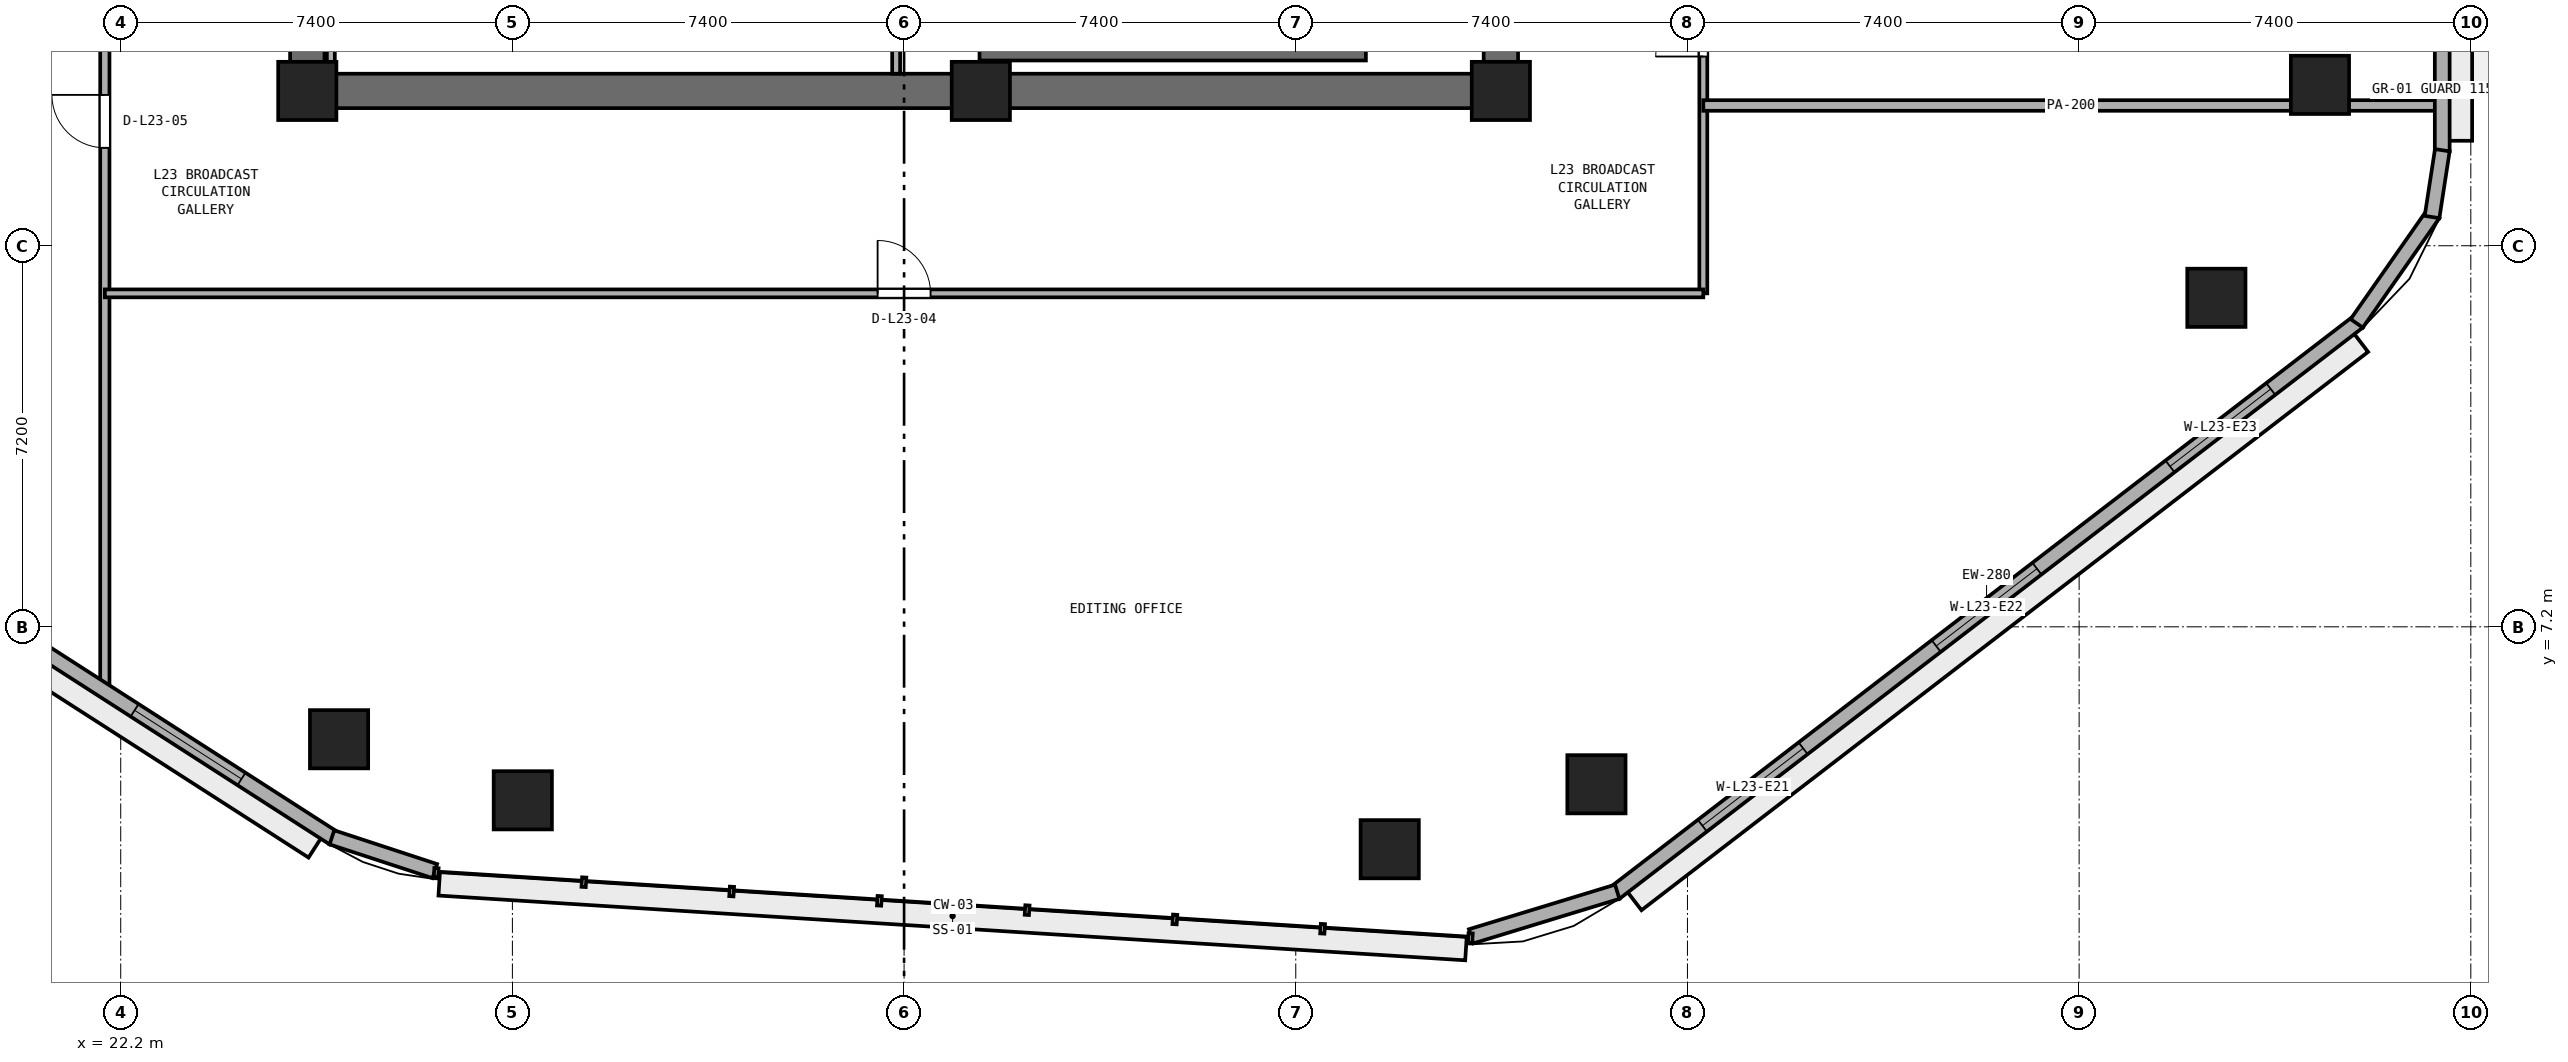
"""IFC4 building model, lengths in metres.
Left out: names, types, materials, properties, quantities, classifications, styles, units other than length and angle.
Written with IfcOpenShell. Run it as: python <this file> out.ifc"""

import sys

from ifc_helpers import new_model, si_unit, direction, frame, frame_2d, origin, origin_2d, place, context, subcontext, project, spatial, rectangle, extrude, element, fill, save


model = new_model("IFC4")
c1 = context("Model", 3, precision=1e-05, world=origin(), true_north=direction((0.0, 1.0)))
c2 = subcontext(c1, "Body", "Model", "MODEL_VIEW")
j1 = project(units=[si_unit("LENGTHUNIT", "METRE"), si_unit("PLANEANGLEUNIT", "RADIAN")], contexts=[c1])
p1 = place(None, origin())
s1 = spatial("IfcSite", under=j1, at=p1, CompositionType="ELEMENT")
p2 = place(p1, origin())
s2 = spatial("IfcBuilding", under=s1, at=p2, CompositionType="ELEMENT")
p3 = place(p2, frame((0.0, 0.0, 93.4)))
s3 = spatial("IfcBuildingStorey", under=s2, at=p3, CompositionType="ELEMENT", Elevation=93.4)
p4 = place(p3, frame((25.4, 17.325, 0.0), z_axis=(0.0, 0.0, 1.0), x_axis=(1.0, 0.0, 0.0)))
e1 = element("IfcWall", 1, at=p4, inside=s3, PredefinedType="SHEAR", context=c2, shape_type="SweptSolid", body=[
    extrude(rectangle(XDim=23.2, YDim=0.65, at=frame_2d((11.6, 0.0))), origin(), (0.0, 0.0, 1.0), 3.525),
])
p5 = place(p3, frame((25.725, 17.65, 0.0), z_axis=(0.0, 0.0, 1.0), x_axis=(0.0, 1.0, 0.0)))
e2 = element("IfcWall", 2, at=p5, inside=s3, PredefinedType="SHEAR", context=c2, shape_type="SweptSolid", body=[
    extrude(rectangle(XDim=15.1, YDim=0.65, at=frame_2d((7.55, 0.0))), origin(), (0.0, 0.0, 1.0), 3.525),
])
p6 = place(p5, frame((6.8, 0.0, 0.0)))
e3 = element("IfcOpeningElement", 3, at=p6, cuts=e2, PredefinedType="OPENING", context=c2, shape_type="SweptSolid", body=[
    extrude(rectangle(XDim=1.5, YDim=2.15, at=frame_2d((0.75, 1.075))), frame((0.0, 0.335, 0.0), z_axis=(0.0, -1.0, 0.0), x_axis=(1.0, 0.0, 0.0)), (0.0, 0.0, 1.0), 0.67),
])
p7 = place(p3, frame((48.275, 17.65, 0.0), z_axis=(0.0, 0.0, 1.0), x_axis=(0.0, 1.0, 0.0)))
e4 = element("IfcWall", 4, at=p7, inside=s3, PredefinedType="SHEAR", context=c2, shape_type="SweptSolid", body=[
    extrude(rectangle(XDim=15.1, YDim=0.65, at=frame_2d((7.55, 0.0))), origin(), (0.0, 0.0, 1.0), 3.525),
])
p8 = place(p7, frame((5.65, 0.0, 0.0)))
e5 = element("IfcOpeningElement", 5, at=p8, cuts=e4, PredefinedType="OPENING", context=c2, shape_type="SweptSolid", body=[
    extrude(rectangle(XDim=1.5, YDim=2.15, at=frame_2d((0.75, 1.075))), frame((0.0, 0.335, 0.0), z_axis=(0.0, -1.0, 0.0), x_axis=(1.0, 0.0, 0.0)), (0.0, 0.0, 1.0), 0.67),
])
for number, where, z_axis, x_axis in (
    (6, (25.725, 17.325, 0.0), (0.0, 0.0, 1.0), (1.0, 0.0, 0.0)),
    (7, (38.45, 17.325, 0.0), (0.0, 0.0, 1.0), (1.0, 0.0, 0.0)),
    (8, (48.275, 17.325, 0.0), (0.0, 0.0, 1.0), (1.0, 0.0, 0.0)),
):
    element("IfcColumn", number, at=place(p3, frame(where, z_axis=z_axis, x_axis=x_axis)), inside=s3, PredefinedType="PILASTER", context=c2, shape_type="SweptSolid", body=[
        extrude(rectangle(XDim=1.1, YDim=1.1, at=origin_2d()), origin(), (0.0, 0.0, 1.0), 3.8),
    ])
for number, where, z_axis, x_axis in (
    (9, (29.796, 3.922, 0.0), (0.0, 0.0, 1.0), (1.0, 0.0, 0.0)),
    (10, (46.175, 2.998, 0.0), (0.0, 0.0, 1.0), (1.0, 0.0, 0.0)),
    (11, (50.081, 4.225, 0.0), (0.0, 0.0, 1.0), (1.0, 0.0, 0.0)),
    (12, (61.793, 13.416, 0.0), (0.0, 0.0, 1.0), (1.0, 0.0, 0.0)),
    (13, (63.75, 17.44, 0.0), (0.0, 0.0, 1.0), (1.0, 0.0, 0.0)),
    (14, (26.325, 5.076, 0.0), (0.0, 0.0, 1.0), (1.0, 0.0, 0.0)),
):
    element("IfcColumn", number, at=place(p3, frame(where, z_axis=z_axis, x_axis=x_axis)), inside=s3, PredefinedType="COLUMN", context=c2, shape_type="SweptSolid", body=[
        extrude(rectangle(XDim=1.1, YDim=1.1, at=origin_2d()), origin(), (0.0, 0.0, 1.0), 3.8),
    ])
p9 = place(p3, frame((38.425, 18.025, 0.0), z_axis=(0.0, 0.0, 1.0), x_axis=(1.0, 0.0, 0.0)))
e15 = element("IfcWall", 15, at=p9, inside=s3, PredefinedType="SHEAR", context=c2, shape_type="SweptSolid", body=[
    extrude(rectangle(XDim=7.3, YDim=0.25, at=frame_2d((3.65, 0.0))), origin(), (0.0, 0.0, 1.0), 3.525),
])
for number, where, z_axis, x_axis in (
    (16, (26.17, 17.65, 0.0), (0.0, 0.0, 1.0), (0.0, 1.0, 0.0)),
    (17, (36.85, 17.65, 0.0), (0.0, 0.0, 1.0), (0.0, 1.0, 0.0)),
):
    element("IfcWall", number, at=place(p3, frame(where, z_axis=z_axis, x_axis=x_axis)), inside=s3, PredefinedType="PARTITIONING", context=c2, shape_type="SweptSolid", body=[
        extrude(rectangle(XDim=2.1, YDim=0.15, at=frame_2d((1.05, 0.0))), origin(), (0.0, 0.0, 1.0), 3.525),
    ])
p10 = place(p3, frame((52.1, 13.5, 0.0), z_axis=(0.0, 0.0, 1.0), x_axis=(0.0, 1.0, 0.0)))
e18 = element("IfcWall", 18, at=p10, inside=s3, PredefinedType="PARTITIONING", context=c2, shape_type="SweptSolid", body=[
    extrude(rectangle(XDim=33.723, YDim=0.15, at=frame_2d((16.861, 0.0))), origin(), (0.0, 0.0, 1.0), 3.525),
])
p11 = place(p10, frame((4.475, 0.0, 0.0)))
e19 = element("IfcOpeningElement", 19, at=p11, cuts=e18, PredefinedType="OPENING", context=c2, shape_type="SweptSolid", body=[
    extrude(rectangle(XDim=0.9, YDim=2.1, at=frame_2d((0.45, 1.05))), frame((0.0, 0.085, 0.0), z_axis=(0.0, -1.0, 0.0), x_axis=(1.0, 0.0, 0.0)), (0.0, 0.0, 1.0), 0.17),
])
p12 = place(p10, frame((9.85, 0.0, 0.0)))
e20 = element("IfcOpeningElement", 20, at=p12, cuts=e18, PredefinedType="OPENING", context=c2, shape_type="SweptSolid", body=[
    extrude(rectangle(XDim=0.9, YDim=2.1, at=frame_2d((0.45, 1.05))), frame((0.0, 0.085, 0.0), z_axis=(0.0, -1.0, 0.0), x_axis=(1.0, 0.0, 0.0)), (0.0, 0.0, 1.0), 0.17),
])
p13 = place(p10, frame((18.4, 0.0, 0.0)))
e21 = element("IfcOpeningElement", 21, at=p13, cuts=e18, PredefinedType="OPENING", context=c2, shape_type="SweptSolid", body=[
    extrude(rectangle(XDim=0.9, YDim=2.1, at=frame_2d((0.45, 1.05))), frame((0.0, 0.085, 0.0), z_axis=(0.0, -1.0, 0.0), x_axis=(1.0, 0.0, 0.0)), (0.0, 0.0, 1.0), 0.17),
])
p14 = place(p3, frame((21.9, 5.958, 0.0), z_axis=(0.0, 0.0, 1.0), x_axis=(0.0, 1.0, 0.0)))
e22 = element("IfcWall", 22, at=p14, inside=s3, PredefinedType="PARTITIONING", context=c2, shape_type="SweptSolid", body=[
    extrude(rectangle(XDim=30.942, YDim=0.175, at=frame_2d((15.471, 0.0))), origin(), (0.0, 0.0, 1.0), 3.525),
])
p15 = place(p14, frame((10.292, 0.0, 0.0)))
e23 = element("IfcOpeningElement", 23, at=p15, cuts=e22, PredefinedType="OPENING", context=c2, shape_type="SweptSolid", body=[
    extrude(rectangle(XDim=1.0, YDim=2.12, at=frame_2d((0.5, 1.06))), frame((0.0, 0.097, 0.0), z_axis=(0.0, -1.0, 0.0), x_axis=(1.0, 0.0, 0.0)), (0.0, 0.0, 1.0), 0.195),
])
p16 = place(p14, frame((16.842, 0.0, 0.0)))
e24 = element("IfcOpeningElement", 24, at=p16, cuts=e22, PredefinedType="OPENING", context=c2, shape_type="SweptSolid", body=[
    extrude(rectangle(XDim=1.0, YDim=2.12, at=frame_2d((0.5, 1.06))), frame((0.0, 0.097, 0.0), z_axis=(0.0, -1.0, 0.0), x_axis=(1.0, 0.0, 0.0)), (0.0, 0.0, 1.0), 0.195),
])
p17 = place(p14, frame((23.492, 0.0, 0.0)))
e25 = element("IfcOpeningElement", 25, at=p17, cuts=e22, PredefinedType="OPENING", context=c2, shape_type="SweptSolid", body=[
    extrude(rectangle(XDim=0.9, YDim=2.1, at=frame_2d((0.45, 1.05))), frame((0.0, 0.097, 0.0), z_axis=(0.0, -1.0, 0.0), x_axis=(1.0, 0.0, 0.0)), (0.0, 0.0, 1.0), 0.195),
])
p18 = place(p3, frame((21.9, 13.5, 0.0), z_axis=(0.0, 0.0, 1.0), x_axis=(1.0, 0.0, 0.0)))
e26 = element("IfcWall", 26, at=p18, inside=s3, PredefinedType="PARTITIONING", context=c2, shape_type="SweptSolid", body=[
    extrude(rectangle(XDim=30.2, YDim=0.15, at=frame_2d((15.1, 0.0))), origin(), (0.0, 0.0, 1.0), 3.525),
])
p19 = place(p18, frame((14.6, 0.0, 0.0)))
e27 = element("IfcOpeningElement", 27, at=p19, cuts=e26, PredefinedType="OPENING", context=c2, shape_type="SweptSolid", body=[
    extrude(rectangle(XDim=1.0, YDim=2.12, at=frame_2d((0.5, 1.06))), frame((0.0, 0.085, 0.0), z_axis=(0.0, -1.0, 0.0), x_axis=(1.0, 0.0, 0.0)), (0.0, 0.0, 1.0), 0.17),
])
p20 = place(p3, frame((52.1, 17.05, 0.0), z_axis=(0.0, 0.0, 1.0), x_axis=(1.0, 0.0, 0.0)))
e28 = element("IfcWall", 28, at=p20, inside=s3, PredefinedType="PARTITIONING", context=c2, shape_type="SweptSolid", body=[
    extrude(rectangle(XDim=13.895, YDim=0.2, at=frame_2d((6.948, 0.0))), origin(), (0.0, 0.0, 1.0), 3.525),
])
p21 = place(p3, frame((50.429, 2.172, 0.0), z_axis=(0.0, 0.0, 1.0), x_axis=(0.792937466367, 0.609303023488, 0.0)))
e29 = element("IfcWall", 29, at=p21, inside=s3, PredefinedType="STANDARD", context=c2, shape_type="SweptSolid", body=[
    extrude(rectangle(XDim=17.713, YDim=0.28, at=frame_2d((8.856, 0.0))), origin(), (0.0, 0.0, 1.0), 3.525),
])
p22 = place(p21, frame((2.085, 0.0, 0.9)))
e30 = element("IfcOpeningElement", 30, at=p22, cuts=e29, PredefinedType="OPENING", context=c2, shape_type="SweptSolid", body=[
    extrude(rectangle(XDim=2.4, YDim=1.75, at=frame_2d((1.2, 0.875))), frame((0.0, 0.15, 0.0), z_axis=(0.0, -1.0, 0.0), x_axis=(1.0, 0.0, 0.0)), (0.0, 0.0, 1.0), 0.3),
])
p23 = place(p21, frame((7.656, 0.0, 0.9)))
e31 = element("IfcOpeningElement", 31, at=p23, cuts=e29, PredefinedType="OPENING", context=c2, shape_type="SweptSolid", body=[
    extrude(rectangle(XDim=2.4, YDim=1.75, at=frame_2d((1.2, 0.875))), frame((0.0, 0.15, 0.0), z_axis=(0.0, -1.0, 0.0), x_axis=(1.0, 0.0, 0.0)), (0.0, 0.0, 1.0), 0.3),
])
p24 = place(p21, frame((13.227, 0.0, 0.9)))
e32 = element("IfcOpeningElement", 32, at=p24, cuts=e29, PredefinedType="OPENING", context=c2, shape_type="SweptSolid", body=[
    extrude(rectangle(XDim=2.4, YDim=1.75, at=frame_2d((1.2, 0.875))), frame((0.0, 0.15, 0.0), z_axis=(0.0, -1.0, 0.0), x_axis=(1.0, 0.0, 0.0)), (0.0, 0.0, 1.0), 0.3),
])
p25 = place(p3, frame((66.06, 16.183, 0.0), z_axis=(0.0, 0.0, 1.0), x_axis=(0.0, 1.0, 0.0)))
e33 = element("IfcWall", 33, at=p25, inside=s3, PredefinedType="STANDARD", context=c2, shape_type="SweptSolid", body=[
    extrude(rectangle(XDim=19.331, YDim=0.28, at=frame_2d((9.666, 0.0))), origin(), (0.0, 0.0, 1.0), 3.525),
])
p26 = place(p25, frame((9.115, 0.0, 0.0)))
e34 = element("IfcOpeningElement", 34, at=p26, cuts=e33, PredefinedType="OPENING", context=c2, shape_type="SweptSolid", body=[
    extrude(rectangle(XDim=1.1, YDim=2.2, at=frame_2d((0.55, 1.1))), frame((0.0, 0.15, 0.0), z_axis=(0.0, -1.0, 0.0), x_axis=(1.0, 0.0, 0.0)), (0.0, 0.0, 1.0), 0.3),
])
p27 = place(p25, frame((14.576, 0.0, 0.9)))
e35 = element("IfcOpeningElement", 35, at=p27, cuts=e33, PredefinedType="OPENING", context=c2, shape_type="SweptSolid", body=[
    extrude(rectangle(XDim=2.4, YDim=1.75, at=frame_2d((1.2, 0.875))), frame((0.0, 0.15, 0.0), z_axis=(0.0, -1.0, 0.0), x_axis=(1.0, 0.0, 0.0)), (0.0, 0.0, 1.0), 0.3),
])
p28 = place(p3, frame((11.405, 12.728, 0.0), z_axis=(0.0, 0.0, 1.0), x_axis=(0.841304564637, -0.540561402175, 0.0)))
e36 = element("IfcWall", 36, at=p28, inside=s3, PredefinedType="STANDARD", context=c2, shape_type="SweptSolid", body=[
    extrude(rectangle(XDim=17.612, YDim=0.28, at=frame_2d((8.806, 0.0))), origin(), (0.0, 0.0, 1.0), 3.525),
])
p29 = place(p28, frame((2.069, 0.0, 0.9)))
e37 = element("IfcOpeningElement", 37, at=p29, cuts=e36, PredefinedType="OPENING", context=c2, shape_type="SweptSolid", body=[
    extrude(rectangle(XDim=2.4, YDim=1.75, at=frame_2d((1.2, 0.875))), frame((0.0, 0.15, 0.0), z_axis=(0.0, -1.0, 0.0), x_axis=(1.0, 0.0, 0.0)), (0.0, 0.0, 1.0), 0.3),
])
p30 = place(p28, frame((7.606, 0.0, 0.9)))
e38 = element("IfcOpeningElement", 38, at=p30, cuts=e36, PredefinedType="OPENING", context=c2, shape_type="SweptSolid", body=[
    extrude(rectangle(XDim=2.4, YDim=1.75, at=frame_2d((1.2, 0.875))), frame((0.0, 0.15, 0.0), z_axis=(0.0, -1.0, 0.0), x_axis=(1.0, 0.0, 0.0)), (0.0, 0.0, 1.0), 0.3),
])
p31 = place(p28, frame((13.143, 0.0, 0.9)))
e39 = element("IfcOpeningElement", 39, at=p31, cuts=e36, PredefinedType="OPENING", context=c2, shape_type="SweptSolid", body=[
    extrude(rectangle(XDim=2.4, YDim=1.75, at=frame_2d((1.2, 0.875))), frame((0.0, 0.15, 0.0), z_axis=(0.0, -1.0, 0.0), x_axis=(1.0, 0.0, 0.0)), (0.0, 0.0, 1.0), 0.3),
])
p32 = place(p3, frame((47.712, 1.352, 0.0), z_axis=(0.0, 0.0, 1.0), x_axis=(0.956465727645, 0.291844670743, 0.0)))
e40 = element("IfcWall", 40, at=p32, inside=s3, PredefinedType="STANDARD", context=c2, shape_type="SweptSolid", body=[
    extrude(rectangle(XDim=2.887, YDim=0.28, at=frame_2d((1.443, 0.0))), origin(), (0.0, 0.0, 1.0), 3.525),
])
p33 = place(p3, frame((64.444, 12.933, 0.0), z_axis=(0.0, 0.0, 1.0), x_axis=(0.573176686443, 0.819431806875, 0.0)))
e41 = element("IfcWall", 41, at=p33, inside=s3, PredefinedType="STANDARD", context=c2, shape_type="SweptSolid", body=[
    extrude(rectangle(XDim=2.524, YDim=0.28, at=frame_2d((1.262, 0.0))), origin(), (0.0, 0.0, 1.0), 3.525),
])
p34 = place(p3, frame((65.867, 14.943, 0.0), z_axis=(0.0, 0.0, 1.0), x_axis=(0.152014078361, 0.988378328364, 0.0)))
e42 = element("IfcWall", 42, at=p34, inside=s3, PredefinedType="STANDARD", context=c2, shape_type="SweptSolid", body=[
    extrude(rectangle(XDim=1.277, YDim=0.28, at=frame_2d((0.638, 0.0))), origin(), (0.0, 0.0, 1.0), 3.525),
])
p35 = place(p3, frame((26.19, 3.223, 0.0), z_axis=(0.0, 0.0, 1.0), x_axis=(0.950175683881, -0.311714885371, 0.0)))
e43 = element("IfcWall", 43, at=p35, inside=s3, PredefinedType="STANDARD", context=c2, shape_type="SweptSolid", body=[
    extrude(rectangle(XDim=2.047, YDim=0.28, at=frame_2d((1.023, 0.0))), origin(), (0.0, 0.0, 1.0), 3.525),
])
p36 = place(p19, origin())
e44 = element("IfcDoor", 44, at=p36, inside=s3, OperationType="SINGLE_SWING_LEFT", PredefinedType="DOOR", context=c2, shape_type="SweptSolid", body=[
    extrude(rectangle(XDim=1.0, YDim=2.12, at=frame_2d((0.5, 1.06))), frame((0.0, 0.025, 0.0), z_axis=(0.0, -1.0, 0.0), x_axis=(1.0, 0.0, 0.0)), (0.0, 0.0, 1.0), 0.05),
])
fill(e27, e44)
p37 = place(p15, origin())
e45 = element("IfcDoor", 45, at=p37, inside=s3, OperationType="SINGLE_SWING_RIGHT", PredefinedType="DOOR", context=c2, shape_type="SweptSolid", body=[
    extrude(rectangle(XDim=1.0, YDim=2.12, at=frame_2d((0.5, 1.06))), frame((0.0, 0.025, 0.0), z_axis=(0.0, -1.0, 0.0), x_axis=(1.0, 0.0, 0.0)), (0.0, 0.0, 1.0), 0.05),
])
fill(e23, e45)
p38 = place(p11, origin())
e46 = element("IfcDoor", 46, at=p38, inside=s3, OperationType="SINGLE_SWING_LEFT", PredefinedType="DOOR", context=c2, shape_type="SweptSolid", body=[
    extrude(rectangle(XDim=0.9, YDim=2.1, at=frame_2d((0.45, 1.05))), frame((0.0, 0.025, 0.0), z_axis=(0.0, -1.0, 0.0), x_axis=(1.0, 0.0, 0.0)), (0.0, 0.0, 1.0), 0.05),
])
fill(e19, e46)
p39 = place(p22, origin())
e47 = element("IfcWindow", 47, at=p39, inside=s3, PartitioningType="SINGLE_PANEL", PredefinedType="WINDOW", context=c2, shape_type="SweptSolid", body=[
    extrude(rectangle(XDim=2.4, YDim=1.75, at=frame_2d((1.2, 0.875))), frame((0.0, 0.03, 0.0), z_axis=(0.0, -1.0, 0.0), x_axis=(1.0, 0.0, 0.0)), (0.0, 0.0, 1.0), 0.06),
])
fill(e30, e47)
p40 = place(p23, origin())
e48 = element("IfcWindow", 48, at=p40, inside=s3, PartitioningType="SINGLE_PANEL", PredefinedType="WINDOW", context=c2, shape_type="SweptSolid", body=[
    extrude(rectangle(XDim=2.4, YDim=1.75, at=frame_2d((1.2, 0.875))), frame((0.0, 0.03, 0.0), z_axis=(0.0, -1.0, 0.0), x_axis=(1.0, 0.0, 0.0)), (0.0, 0.0, 1.0), 0.06),
])
fill(e31, e48)
p41 = place(p24, origin())
e49 = element("IfcWindow", 49, at=p41, inside=s3, PartitioningType="SINGLE_PANEL", PredefinedType="WINDOW", context=c2, shape_type="SweptSolid", body=[
    extrude(rectangle(XDim=2.4, YDim=1.75, at=frame_2d((1.2, 0.875))), frame((0.0, 0.03, 0.0), z_axis=(0.0, -1.0, 0.0), x_axis=(1.0, 0.0, 0.0)), (0.0, 0.0, 1.0), 0.06),
])
fill(e32, e49)
p42 = place(p31, origin())
e50 = element("IfcWindow", 50, at=p42, inside=s3, PartitioningType="SINGLE_PANEL", PredefinedType="WINDOW", context=c2, shape_type="SweptSolid", body=[
    extrude(rectangle(XDim=2.4, YDim=1.75, at=frame_2d((1.2, 0.875))), frame((0.0, 0.03, 0.0), z_axis=(0.0, -1.0, 0.0), x_axis=(1.0, 0.0, 0.0)), (0.0, 0.0, 1.0), 0.06),
])
fill(e39, e50)
save(model, sys.argv[1])
